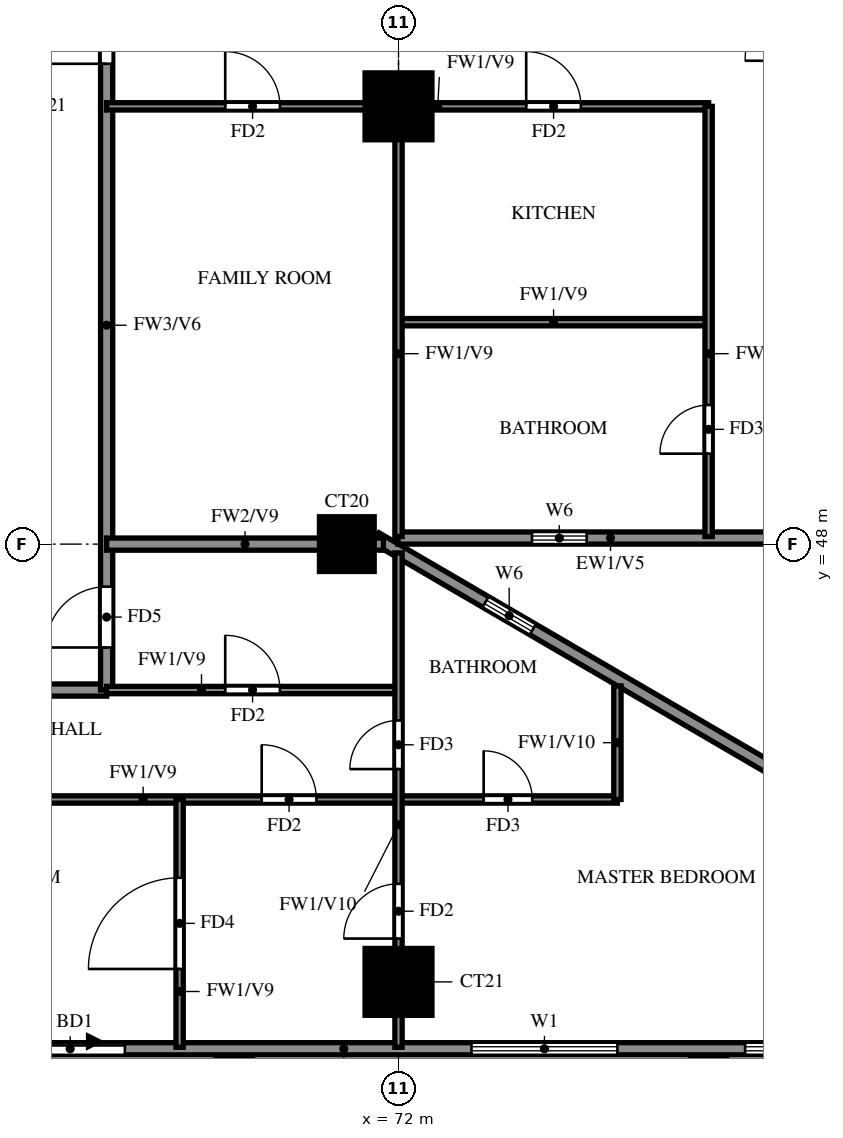
"""IFC4 building model, lengths in metres.
Left out: names, types, materials, properties, quantities, classifications, styles, units other than length and angle.
Written with IfcOpenShell. Run it as: python <this file> out.ifc"""

import sys

from ifc_helpers import new_model, si_unit, direction, frame, frame_2d, origin, origin_2d, place, context, subcontext, project, spatial, rectangle, extrude, source, transform, mapped, element, fill, save


model = new_model("IFC4")
c1 = context("Model", 3, precision=1e-05, world=origin(), true_north=direction((0.0, 1.0)))
c2 = subcontext(c1, "Body", "Model", "MODEL_VIEW")
j1 = project(units=[si_unit("LENGTHUNIT", "METRE"), si_unit("PLANEANGLEUNIT", "RADIAN")], contexts=[c1])
p1 = place(None, origin())
s1 = spatial("IfcSite", under=j1, at=p1, CompositionType="ELEMENT")
p2 = place(p1, origin())
s2 = spatial("IfcBuilding", under=s1, at=p2, CompositionType="ELEMENT")
p3 = place(p2, frame((0.0, 0.0, 134.0)))
s3 = spatial("IfcBuildingStorey", under=s2, at=p3, CompositionType="ELEMENT", Elevation=134.0)
m1 = source(origin(), c2, "Body", "SweptSolid", [
    extrude(rectangle(XDim=1.1, YDim=1.1, at=origin_2d()), origin(), (0.0, 0.0, 1.0), 3.15),
])
p4 = place(p3, frame((72.0, 40.8, 0.0), z_axis=(0.0, 0.0, 1.0), x_axis=(1.0, 0.0, 0.0)))
e1 = element("IfcColumn", 1, at=p4, inside=s3, PredefinedType="COLUMN", context=c2, shape_type="MappedRepresentation", body=[
    mapped(m1, transform((0.0, 0.0, 0.0))),
])
m2 = source(origin(), c2, "Body", "SweptSolid", [
    extrude(rectangle(XDim=0.9, YDim=0.9, at=origin_2d()), origin(), (0.0, 0.0, 1.0), 3.15),
])
p5 = place(p3, frame((71.15, 48.0, 0.0), z_axis=(0.0, 0.0, 1.0), x_axis=(1.0, 0.0, 0.0)))
e2 = element("IfcColumn", 2, at=p5, inside=s3, PredefinedType="COLUMN", context=c2, shape_type="MappedRepresentation", body=[
    mapped(m2, transform((0.0, 0.0, 0.0))),
])
p6 = place(p3, frame((72.0, 55.2, 0.0), z_axis=(0.0, 0.0, 1.0), x_axis=(1.0, 0.0, 0.0)))
e3 = element("IfcColumn", 3, at=p6, inside=s3, PredefinedType="COLUMN", context=c2, shape_type="MappedRepresentation", body=[
    mapped(m1, transform((0.0, 0.0, 0.0))),
])
p7 = place(p3, frame((85.719, 39.881, 0.0), z_axis=(0.0, 0.0, 1.0), x_axis=(-0.86377618652, 0.503875678716, 0.0)))
e4 = element("IfcWall", 4, at=p7, inside=s3, PredefinedType="SOLIDWALL", context=c2, shape_type="SweptSolid", body=[
    extrude(rectangle(XDim=16.311, YDim=0.2, at=frame_2d((8.156, 0.0))), origin(), (0.0, 0.0, 1.0), 3.15),
])
p8 = place(p7, frame((13.326, 0.0, 1.5)))
e5 = element("IfcOpeningElement", 5, at=p8, cuts=e4, PredefinedType="OPENING", context=c2, shape_type="SweptSolid", body=[
    extrude(rectangle(XDim=0.9, YDim=0.9, at=frame_2d((0.45, 0.45))), frame((0.0, 0.11, 0.0), z_axis=(0.0, -1.0, 0.0), x_axis=(1.0, 0.0, 0.0)), (0.0, 0.0, 1.0), 0.22),
])
p9 = place(p3, frame((71.99, 48.1, 0.0), z_axis=(0.0, 0.0, 1.0), x_axis=(1.0, 0.0, 0.0)))
e6 = element("IfcWall", 6, at=p9, inside=s3, PredefinedType="SOLIDWALL", context=c2, shape_type="SweptSolid", body=[
    extrude(rectangle(XDim=6.66, YDim=0.2, at=frame_2d((3.33, 0.0))), origin(), (0.0, 0.0, 1.0), 3.15),
])
p10 = place(p9, frame((2.205, 0.0, 1.5)))
e7 = element("IfcOpeningElement", 7, at=p10, cuts=e6, PredefinedType="OPENING", context=c2, shape_type="SweptSolid", body=[
    extrude(rectangle(XDim=0.9, YDim=0.9, at=frame_2d((0.45, 0.45))), frame((0.0, 0.11, 0.0), z_axis=(0.0, -1.0, 0.0), x_axis=(1.0, 0.0, 0.0)), (0.0, 0.0, 1.0), 0.22),
])
p11 = place(p3, frame((58.8, 39.7, 0.0), z_axis=(0.0, 0.0, 1.0), x_axis=(1.0, 0.0, 0.0)))
e8 = element("IfcWall", 8, at=p11, inside=s3, PredefinedType="SOLIDWALL", context=c2, shape_type="SweptSolid", body=[
    extrude(rectangle(XDim=24.6, YDim=0.2, at=frame_2d((12.3, 0.0))), origin(), (0.0, 0.0, 1.0), 3.15),
])
p12 = place(p11, frame((6.9, 0.0, 0.0)))
e9 = element("IfcOpeningElement", 9, at=p12, cuts=e8, PredefinedType="OPENING", context=c2, shape_type="SweptSolid", body=[
    extrude(rectangle(XDim=1.8, YDim=2.4, at=frame_2d((0.9, 1.2))), frame((0.0, 0.11, 0.0), z_axis=(0.0, -1.0, 0.0), x_axis=(1.0, 0.0, 0.0)), (0.0, 0.0, 1.0), 0.22),
])
p13 = place(p11, frame((20.7, 0.0, 0.0)))
e10 = element("IfcOpeningElement", 10, at=p13, cuts=e8, PredefinedType="OPENING", context=c2, shape_type="SweptSolid", body=[
    extrude(rectangle(XDim=1.8, YDim=2.4, at=frame_2d((0.9, 1.2))), frame((0.0, 0.11, 0.0), z_axis=(0.0, -1.0, 0.0), x_axis=(1.0, 0.0, 0.0)), (0.0, 0.0, 1.0), 0.22),
])
p14 = place(p11, frame((1.5, 0.0, 0.6)))
e11 = element("IfcOpeningElement", 11, at=p14, cuts=e8, PredefinedType="OPENING", context=c2, shape_type="SweptSolid", body=[
    extrude(rectangle(XDim=1.8, YDim=2.4, at=frame_2d((0.9, 1.2))), frame((0.0, 0.11, 0.0), z_axis=(0.0, -1.0, 0.0), x_axis=(1.0, 0.0, 0.0)), (0.0, 0.0, 1.0), 0.22),
])
p15 = place(p11, frame((4.5, 0.0, 0.6)))
e12 = element("IfcOpeningElement", 12, at=p15, cuts=e8, PredefinedType="OPENING", context=c2, shape_type="SweptSolid", body=[
    extrude(rectangle(XDim=1.8, YDim=2.4, at=frame_2d((0.9, 1.2))), frame((0.0, 0.11, 0.0), z_axis=(0.0, -1.0, 0.0), x_axis=(1.0, 0.0, 0.0)), (0.0, 0.0, 1.0), 0.22),
])
p16 = place(p11, frame((14.4, 0.0, 0.6)))
e13 = element("IfcOpeningElement", 13, at=p16, cuts=e8, PredefinedType="OPENING", context=c2, shape_type="SweptSolid", body=[
    extrude(rectangle(XDim=2.4, YDim=2.4, at=frame_2d((1.2, 1.2))), frame((0.0, 0.11, 0.0), z_axis=(0.0, -1.0, 0.0), x_axis=(1.0, 0.0, 0.0)), (0.0, 0.0, 1.0), 0.22),
])
p17 = place(p11, frame((18.9, 0.0, 0.6)))
e14 = element("IfcOpeningElement", 14, at=p17, cuts=e8, PredefinedType="OPENING", context=c2, shape_type="SweptSolid", body=[
    extrude(rectangle(XDim=1.2, YDim=2.4, at=frame_2d((0.6, 1.2))), frame((0.0, 0.11, 0.0), z_axis=(0.0, -1.0, 0.0), x_axis=(1.0, 0.0, 0.0)), (0.0, 0.0, 1.0), 0.22),
])
p18 = place(p11, frame((23.0, 0.0, 0.6)))
e15 = element("IfcOpeningElement", 15, at=p18, cuts=e8, PredefinedType="OPENING", context=c2, shape_type="SweptSolid", body=[
    extrude(rectangle(XDim=1.2, YDim=2.4, at=frame_2d((0.6, 1.2))), frame((0.0, 0.11, 0.0), z_axis=(0.0, -1.0, 0.0), x_axis=(1.0, 0.0, 0.0)), (0.0, 0.0, 1.0), 0.22),
])
p19 = place(p3, frame((60.0, 45.6, 0.0), z_axis=(0.0, 0.0, 1.0), x_axis=(1.0, 0.0, 0.0)))
e16 = element("IfcWall", 16, at=p19, inside=s3, PredefinedType="SOLIDWALL", context=c2, shape_type="SweptSolid", body=[
    extrude(rectangle(XDim=7.2, YDim=0.2, at=frame_2d((3.6, 0.0))), origin(), (0.0, 0.0, 1.0), 3.15),
])
p20 = place(p3, frame((67.2, 45.6, 0.0), z_axis=(0.0, 0.0, 1.0), x_axis=(0.0, 1.0, 0.0)))
e17 = element("IfcWall", 17, at=p20, inside=s3, PredefinedType="SOLIDWALL", context=c2, shape_type="SweptSolid", body=[
    extrude(rectangle(XDim=12.0, YDim=0.2, at=frame_2d((6.0, 0.0))), origin(), (0.0, 0.0, 1.0), 3.15),
])
p21 = place(p20, frame((10.3, 0.0, 0.0)))
e18 = element("IfcOpeningElement", 18, at=p21, cuts=e17, PredefinedType="OPENING", context=c2, shape_type="SweptSolid", body=[
    extrude(rectangle(XDim=1.0, YDim=2.1, at=frame_2d((0.5, 1.05))), frame((0.0, 0.11, 0.0), z_axis=(0.0, -1.0, 0.0), x_axis=(1.0, 0.0, 0.0)), (0.0, 0.0, 1.0), 0.22),
])
p22 = place(p20, frame((0.7, 0.0, 0.0)))
e19 = element("IfcOpeningElement", 19, at=p22, cuts=e17, PredefinedType="OPENING", context=c2, shape_type="SweptSolid", body=[
    extrude(rectangle(XDim=1.0, YDim=2.1, at=frame_2d((0.5, 1.05))), frame((0.0, 0.11, 0.0), z_axis=(0.0, -1.0, 0.0), x_axis=(1.0, 0.0, 0.0)), (0.0, 0.0, 1.0), 0.22),
])
p23 = place(p3, frame((67.2, 48.0, 0.0), z_axis=(0.0, 0.0, 1.0), x_axis=(1.0, 0.0, 0.0)))
e20 = element("IfcWall", 20, at=p23, inside=s3, PredefinedType="SOLIDWALL", context=c2, shape_type="SweptSolid", body=[
    extrude(rectangle(XDim=4.552, YDim=0.2, at=frame_2d((2.276, 0.0))), origin(), (0.0, 0.0, 1.0), 3.15),
])
p24 = place(p3, frame((60.0, 43.8, 0.0), z_axis=(0.0, 0.0, 1.0), x_axis=(1.0, 0.0, 0.0)))
e21 = element("IfcWall", 21, at=p24, inside=s3, PredefinedType="PARTITIONING", context=c2, shape_type="SweptSolid", body=[
    extrude(rectangle(XDim=15.6, YDim=0.12, at=frame_2d((7.8, 0.0))), origin(), (0.0, 0.0, 1.0), 3.15),
])
p25 = place(p24, frame((9.75, 0.0, 0.0)))
e22 = element("IfcOpeningElement", 22, at=p25, cuts=e21, PredefinedType="OPENING", context=c2, shape_type="SweptSolid", body=[
    extrude(rectangle(XDim=0.9, YDim=2.1, at=frame_2d((0.45, 1.05))), frame((0.0, 0.07, 0.0), z_axis=(0.0, -1.0, 0.0), x_axis=(1.0, 0.0, 0.0)), (0.0, 0.0, 1.0), 0.14),
])
p26 = place(p24, frame((3.45, 0.0, 0.0)))
e23 = element("IfcOpeningElement", 23, at=p26, cuts=e21, PredefinedType="OPENING", context=c2, shape_type="SweptSolid", body=[
    extrude(rectangle(XDim=1.5, YDim=2.1, at=frame_2d((0.75, 1.05))), frame((0.0, 0.07, 0.0), z_axis=(0.0, -1.0, 0.0), x_axis=(1.0, 0.0, 0.0)), (0.0, 0.0, 1.0), 0.14),
])
p27 = place(p24, frame((13.4, 0.0, 0.0)))
e24 = element("IfcOpeningElement", 24, at=p27, cuts=e21, PredefinedType="OPENING", context=c2, shape_type="SweptSolid", body=[
    extrude(rectangle(XDim=0.8, YDim=2.1, at=frame_2d((0.4, 1.05))), frame((0.0, 0.07, 0.0), z_axis=(0.0, -1.0, 0.0), x_axis=(1.0, 0.0, 0.0)), (0.0, 0.0, 1.0), 0.14),
])
p28 = place(p3, frame((67.2, 45.6, 0.0), z_axis=(0.0, 0.0, 1.0), x_axis=(1.0, 0.0, 0.0)))
e25 = element("IfcWall", 25, at=p28, inside=s3, PredefinedType="PARTITIONING", context=c2, shape_type="SweptSolid", body=[
    extrude(rectangle(XDim=4.8, YDim=0.12, at=frame_2d((2.4, 0.0))), origin(), (0.0, 0.0, 1.0), 3.15),
])
p29 = place(p28, frame((1.95, 0.0, 0.0)))
e26 = element("IfcOpeningElement", 26, at=p29, cuts=e25, PredefinedType="OPENING", context=c2, shape_type="SweptSolid", body=[
    extrude(rectangle(XDim=0.9, YDim=2.1, at=frame_2d((0.45, 1.05))), frame((0.0, 0.07, 0.0), z_axis=(0.0, -1.0, 0.0), x_axis=(1.0, 0.0, 0.0)), (0.0, 0.0, 1.0), 0.14),
])
p30 = place(p3, frame((72.0, 51.65, 0.0), z_axis=(0.0, 0.0, 1.0), x_axis=(1.0, 0.0, 0.0)))
e27 = element("IfcWall", 27, at=p30, inside=s3, PredefinedType="PARTITIONING", context=c2, shape_type="SweptSolid", body=[
    extrude(rectangle(XDim=5.1, YDim=0.12, at=frame_2d((2.55, 0.0))), origin(), (0.0, 0.0, 1.0), 3.15),
])
p31 = place(p3, frame((67.2, 55.2, 0.0), z_axis=(0.0, 0.0, 1.0), x_axis=(1.0, 0.0, 0.0)))
e28 = element("IfcWall", 28, at=p31, inside=s3, PredefinedType="PARTITIONING", context=c2, shape_type="SweptSolid", body=[
    extrude(rectangle(XDim=9.9, YDim=0.12, at=frame_2d((4.95, 0.0))), origin(), (0.0, 0.0, 1.0), 3.15),
])
p32 = place(p31, frame((6.9, 0.0, 0.0)))
e29 = element("IfcOpeningElement", 29, at=p32, cuts=e28, PredefinedType="OPENING", context=c2, shape_type="SweptSolid", body=[
    extrude(rectangle(XDim=0.9, YDim=2.1, at=frame_2d((0.45, 1.05))), frame((0.0, 0.07, 0.0), z_axis=(0.0, -1.0, 0.0), x_axis=(1.0, 0.0, 0.0)), (0.0, 0.0, 1.0), 0.14),
])
p33 = place(p31, frame((1.95, 0.0, 0.0)))
e30 = element("IfcOpeningElement", 30, at=p33, cuts=e28, PredefinedType="OPENING", context=c2, shape_type="SweptSolid", body=[
    extrude(rectangle(XDim=0.9, YDim=2.1, at=frame_2d((0.45, 1.05))), frame((0.0, 0.07, 0.0), z_axis=(0.0, -1.0, 0.0), x_axis=(1.0, 0.0, 0.0)), (0.0, 0.0, 1.0), 0.14),
])
p34 = place(p3, frame((68.4, 39.725, 0.0), z_axis=(0.0, 0.0, 1.0), x_axis=(0.0, 1.0, 0.0)))
e31 = element("IfcWall", 31, at=p34, inside=s3, PredefinedType="PARTITIONING", context=c2, shape_type="SweptSolid", body=[
    extrude(rectangle(XDim=4.075, YDim=0.12, at=frame_2d((2.038, 0.0))), origin(), (0.0, 0.0, 1.0), 3.15),
])
p35 = place(p34, frame((1.288, 0.0, 0.0)))
e32 = element("IfcOpeningElement", 32, at=p35, cuts=e31, PredefinedType="OPENING", context=c2, shape_type="SweptSolid", body=[
    extrude(rectangle(XDim=1.5, YDim=2.1, at=frame_2d((0.75, 1.05))), frame((0.0, 0.07, 0.0), z_axis=(0.0, -1.0, 0.0), x_axis=(1.0, 0.0, 0.0)), (0.0, 0.0, 1.0), 0.14),
])
p36 = place(p3, frame((72.0, 39.725, 0.0), z_axis=(0.0, 0.0, 1.0), x_axis=(0.0, 1.0, 0.0)))
e33 = element("IfcWall", 33, at=p36, inside=s3, PredefinedType="PARTITIONING", context=c2, shape_type="SweptSolid", body=[
    extrude(rectangle(XDim=8.13, YDim=0.12, at=frame_2d((4.065, 0.0))), origin(), (0.0, 0.0, 1.0), 2.25),
])
p37 = place(p36, frame((1.788, 0.0, 0.0)))
e34 = element("IfcOpeningElement", 34, at=p37, cuts=e33, PredefinedType="OPENING", context=c2, shape_type="SweptSolid", body=[
    extrude(rectangle(XDim=0.9, YDim=2.1, at=frame_2d((0.45, 1.05))), frame((0.0, 0.07, 0.0), z_axis=(0.0, -1.0, 0.0), x_axis=(1.0, 0.0, 0.0)), (0.0, 0.0, 1.0), 0.14),
])
p38 = place(p36, frame((4.575, 0.0, 0.0)))
e35 = element("IfcOpeningElement", 35, at=p38, cuts=e33, PredefinedType="OPENING", context=c2, shape_type="SweptSolid", body=[
    extrude(rectangle(XDim=0.8, YDim=2.1, at=frame_2d((0.4, 1.05))), frame((0.0, 0.07, 0.0), z_axis=(0.0, -1.0, 0.0), x_axis=(1.0, 0.0, 0.0)), (0.0, 0.0, 1.0), 0.14),
])
p39 = place(p3, frame((72.0, 48.125, 0.0), z_axis=(0.0, 0.0, 1.0), x_axis=(0.0, 1.0, 0.0)))
e36 = element("IfcWall", 36, at=p39, inside=s3, PredefinedType="PARTITIONING", context=c2, shape_type="SweptSolid", body=[
    extrude(rectangle(XDim=7.075, YDim=0.12, at=frame_2d((3.538, 0.0))), origin(), (0.0, 0.0, 1.0), 3.15),
])
p40 = place(p3, frame((75.6, 43.8, 0.0), z_axis=(0.0, 0.0, 1.0), x_axis=(0.0, 1.0, 0.0)))
e37 = element("IfcWall", 37, at=p40, inside=s3, PredefinedType="PARTITIONING", context=c2, shape_type="SweptSolid", body=[
    extrude(rectangle(XDim=1.868, YDim=0.12, at=frame_2d((0.934, 0.0))), origin(), (0.0, 0.0, 1.0), 2.25),
])
p41 = place(p3, frame((77.1, 48.125, 0.0), z_axis=(0.0, 0.0, 1.0), x_axis=(0.0, 1.0, 0.0)))
e38 = element("IfcWall", 38, at=p41, inside=s3, PredefinedType="PARTITIONING", context=c2, shape_type="SweptSolid", body=[
    extrude(rectangle(XDim=7.075, YDim=0.12, at=frame_2d((3.538, 0.0))), origin(), (0.0, 0.0, 1.0), 3.15),
])
p42 = place(p41, frame((1.363, 0.0, 0.0)))
e39 = element("IfcOpeningElement", 39, at=p42, cuts=e38, PredefinedType="OPENING", context=c2, shape_type="SweptSolid", body=[
    extrude(rectangle(XDim=0.8, YDim=2.1, at=frame_2d((0.4, 1.05))), frame((0.0, 0.07, 0.0), z_axis=(0.0, -1.0, 0.0), x_axis=(1.0, 0.0, 0.0)), (0.0, 0.0, 1.0), 0.14),
])
p43 = place(p8, origin())
e40 = element("IfcWindow", 40, at=p43, inside=s3, PartitioningType="SINGLE_PANEL", PredefinedType="WINDOW", context=c2, shape_type="SweptSolid", body=[
    extrude(rectangle(XDim=0.9, YDim=0.9, at=frame_2d((0.45, 0.45))), frame((0.0, 0.03, 0.0), z_axis=(0.0, -1.0, 0.0), x_axis=(1.0, 0.0, 0.0)), (0.0, 0.0, 1.0), 0.06),
])
fill(e5, e40)
p44 = place(p10, origin())
e41 = element("IfcWindow", 41, at=p44, inside=s3, PartitioningType="SINGLE_PANEL", PredefinedType="WINDOW", context=c2, shape_type="SweptSolid", body=[
    extrude(rectangle(XDim=0.9, YDim=0.9, at=frame_2d((0.45, 0.45))), frame((0.0, 0.03, 0.0), z_axis=(0.0, -1.0, 0.0), x_axis=(1.0, 0.0, 0.0)), (0.0, 0.0, 1.0), 0.06),
])
fill(e7, e41)
p45 = place(p12, origin())
e42 = element("IfcDoor", 42, at=p45, inside=s3, OperationType="DOUBLE_DOOR_SLIDING", PredefinedType="DOOR", context=c2, shape_type="SweptSolid", body=[
    extrude(rectangle(XDim=1.8, YDim=2.4, at=frame_2d((0.9, 1.2))), frame((0.0, 0.025, 0.0), z_axis=(0.0, -1.0, 0.0), x_axis=(1.0, 0.0, 0.0)), (0.0, 0.0, 1.0), 0.05),
])
fill(e9, e42)
p46 = place(p16, origin())
e43 = element("IfcWindow", 43, at=p46, inside=s3, PartitioningType="DOUBLE_PANEL_VERTICAL", PredefinedType="WINDOW", context=c2, shape_type="SweptSolid", body=[
    extrude(rectangle(XDim=2.4, YDim=2.4, at=frame_2d((1.2, 1.2))), frame((0.0, 0.03, 0.0), z_axis=(0.0, -1.0, 0.0), x_axis=(1.0, 0.0, 0.0)), (0.0, 0.0, 1.0), 0.06),
])
fill(e13, e43)
p47 = place(p17, origin())
e44 = element("IfcWindow", 44, at=p47, inside=s3, PartitioningType="SINGLE_PANEL", PredefinedType="WINDOW", context=c2, shape_type="SweptSolid", body=[
    extrude(rectangle(XDim=1.2, YDim=2.4, at=frame_2d((0.6, 1.2))), frame((0.0, 0.03, 0.0), z_axis=(0.0, -1.0, 0.0), x_axis=(1.0, 0.0, 0.0)), (0.0, 0.0, 1.0), 0.06),
])
fill(e14, e44)
p48 = place(p21, origin())
e45 = element("IfcDoor", 45, at=p48, inside=s3, OperationType="SINGLE_SWING_LEFT", PredefinedType="DOOR", context=c2, shape_type="SweptSolid", body=[
    extrude(rectangle(XDim=1.0, YDim=2.1, at=frame_2d((0.5, 1.05))), frame((0.0, 0.025, 0.0), z_axis=(0.0, -1.0, 0.0), x_axis=(1.0, 0.0, 0.0)), (0.0, 0.0, 1.0), 0.05),
])
fill(e18, e45)
p49 = place(p42, origin())
e46 = element("IfcDoor", 46, at=p49, inside=s3, OperationType="SINGLE_SWING_RIGHT", PredefinedType="DOOR", context=c2, shape_type="SweptSolid", body=[
    extrude(rectangle(XDim=0.8, YDim=2.1, at=frame_2d((0.4, 1.05))), frame((0.0, 0.025, 0.0), z_axis=(0.0, -1.0, 0.0), x_axis=(1.0, 0.0, 0.0)), (0.0, 0.0, 1.0), 0.05),
])
fill(e39, e46)
p50 = place(p32, origin())
e47 = element("IfcDoor", 47, at=p50, inside=s3, OperationType="SINGLE_SWING_LEFT", PredefinedType="DOOR", context=c2, shape_type="SweptSolid", body=[
    extrude(rectangle(XDim=0.9, YDim=2.1, at=frame_2d((0.45, 1.05))), frame((0.0, 0.025, 0.0), z_axis=(0.0, -1.0, 0.0), x_axis=(1.0, 0.0, 0.0)), (0.0, 0.0, 1.0), 0.05),
])
fill(e29, e47)
p51 = place(p33, origin())
e48 = element("IfcDoor", 48, at=p51, inside=s3, OperationType="SINGLE_SWING_RIGHT", PredefinedType="DOOR", context=c2, shape_type="SweptSolid", body=[
    extrude(rectangle(XDim=0.9, YDim=2.1, at=frame_2d((0.45, 1.05))), frame((0.0, 0.025, 0.0), z_axis=(0.0, -1.0, 0.0), x_axis=(1.0, 0.0, 0.0)), (0.0, 0.0, 1.0), 0.05),
])
fill(e30, e48)
p52 = place(p35, origin())
e49 = element("IfcDoor", 49, at=p52, inside=s3, OperationType="SINGLE_SWING_LEFT", PredefinedType="DOOR", context=c2, shape_type="SweptSolid", body=[
    extrude(rectangle(XDim=1.5, YDim=2.1, at=frame_2d((0.75, 1.05))), frame((0.0, 0.025, 0.0), z_axis=(0.0, -1.0, 0.0), x_axis=(1.0, 0.0, 0.0)), (0.0, 0.0, 1.0), 0.05),
])
fill(e32, e49)
p53 = place(p29, origin())
e50 = element("IfcDoor", 50, at=p53, inside=s3, OperationType="SINGLE_SWING_LEFT", PredefinedType="DOOR", context=c2, shape_type="SweptSolid", body=[
    extrude(rectangle(XDim=0.9, YDim=2.1, at=frame_2d((0.45, 1.05))), frame((0.0, 0.025, 0.0), z_axis=(0.0, -1.0, 0.0), x_axis=(1.0, 0.0, 0.0)), (0.0, 0.0, 1.0), 0.05),
])
fill(e26, e50)
p54 = place(p22, origin())
e51 = element("IfcDoor", 51, at=p54, inside=s3, OperationType="SINGLE_SWING_RIGHT", PredefinedType="DOOR", context=c2, shape_type="SweptSolid", body=[
    extrude(rectangle(XDim=1.0, YDim=2.1, at=frame_2d((0.5, 1.05))), frame((0.0, 0.025, 0.0), z_axis=(0.0, -1.0, 0.0), x_axis=(1.0, 0.0, 0.0)), (0.0, 0.0, 1.0), 0.05),
])
fill(e19, e51)
p55 = place(p25, origin())
e52 = element("IfcDoor", 52, at=p55, inside=s3, OperationType="SINGLE_SWING_LEFT", PredefinedType="DOOR", context=c2, shape_type="SweptSolid", body=[
    extrude(rectangle(XDim=0.9, YDim=2.1, at=frame_2d((0.45, 1.05))), frame((0.0, 0.025, 0.0), z_axis=(0.0, -1.0, 0.0), x_axis=(1.0, 0.0, 0.0)), (0.0, 0.0, 1.0), 0.05),
])
fill(e22, e52)
p56 = place(p37, origin())
e53 = element("IfcDoor", 53, at=p56, inside=s3, OperationType="SINGLE_SWING_LEFT", PredefinedType="DOOR", context=c2, shape_type="SweptSolid", body=[
    extrude(rectangle(XDim=0.9, YDim=2.1, at=frame_2d((0.45, 1.05))), frame((0.0, 0.025, 0.0), z_axis=(0.0, -1.0, 0.0), x_axis=(1.0, 0.0, 0.0)), (0.0, 0.0, 1.0), 0.05),
])
fill(e34, e53)
p57 = place(p38, origin())
e54 = element("IfcDoor", 54, at=p57, inside=s3, OperationType="SINGLE_SWING_LEFT", PredefinedType="DOOR", context=c2, shape_type="SweptSolid", body=[
    extrude(rectangle(XDim=0.8, YDim=2.1, at=frame_2d((0.4, 1.05))), frame((0.0, 0.025, 0.0), z_axis=(0.0, -1.0, 0.0), x_axis=(1.0, 0.0, 0.0)), (0.0, 0.0, 1.0), 0.05),
])
fill(e35, e54)
p58 = place(p27, origin())
e55 = element("IfcDoor", 55, at=p58, inside=s3, OperationType="SINGLE_SWING_LEFT", PredefinedType="DOOR", context=c2, shape_type="SweptSolid", body=[
    extrude(rectangle(XDim=0.8, YDim=2.1, at=frame_2d((0.4, 1.05))), frame((0.0, 0.025, 0.0), z_axis=(0.0, -1.0, 0.0), x_axis=(1.0, 0.0, 0.0)), (0.0, 0.0, 1.0), 0.05),
])
fill(e24, e55)
save(model, sys.argv[1])
